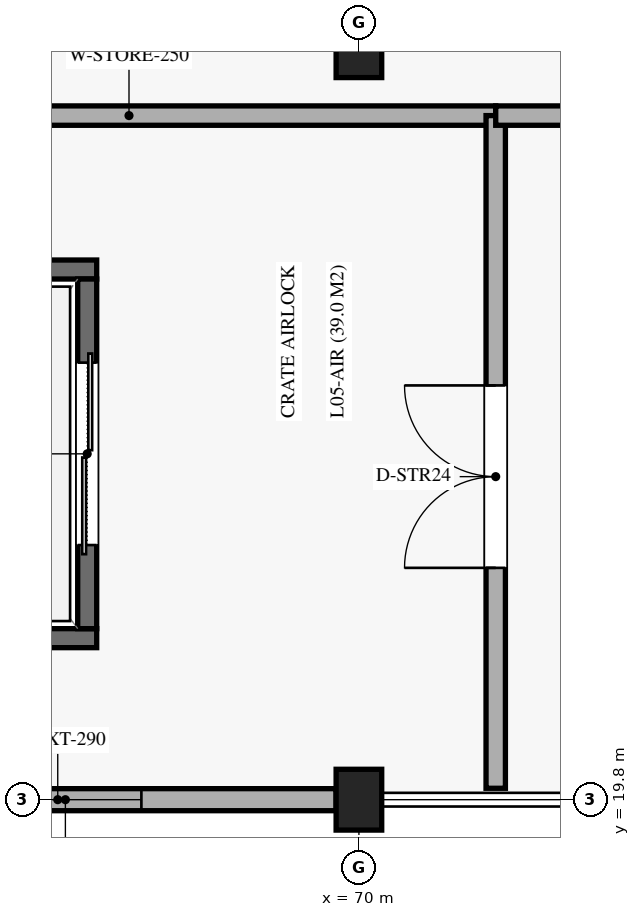
"""IFC4 building model, lengths in metres.
Left out: names, types, materials, properties, quantities, classifications, styles, units other than length and angle.
Written with IfcOpenShell. Run it as: python <this file> out.ifc"""

import sys

from ifc_helpers import new_model, si_unit, direction, frame, frame_2d, origin, origin_2d, place, context, subcontext, project, spatial, rectangle, extrude, element, fill, save


model = new_model("IFC4")
c1 = context("Model", 3, precision=1e-05, world=origin(), true_north=direction((0.0, 1.0)))
c2 = subcontext(c1, "Body", "Model", "MODEL_VIEW")
j1 = project(units=[si_unit("LENGTHUNIT", "METRE"), si_unit("PLANEANGLEUNIT", "RADIAN")], contexts=[c1])
p1 = place(None, origin())
s1 = spatial("IfcSite", under=j1, at=p1, CompositionType="ELEMENT")
p2 = place(p1, origin())
s2 = spatial("IfcBuilding", under=s1, at=p2, CompositionType="ELEMENT")
p3 = place(p2, frame((0.0, 0.0, 28.56)))
s3 = spatial("IfcBuildingStorey", under=s2, at=p3, CompositionType="ELEMENT", Elevation=28.56)
for number, where, z_axis, x_axis in (
    (1, (70.0, 19.8, 0.0), (0.0, 0.0, 1.0), (1.0, 0.0, 0.0)),
    (2, (70.0, 29.7, 0.0), (0.0, 0.0, 1.0), (1.0, 0.0, 0.0)),
):
    element("IfcColumn", number, at=place(p3, frame(where, z_axis=z_axis, x_axis=x_axis)), inside=s3, PredefinedType="COLUMN", context=c2, shape_type="SweptSolid", body=[
        extrude(rectangle(XDim=0.6, YDim=0.8, at=origin_2d()), origin(), (0.0, 0.0, 1.0), 4.59),
    ])
p4 = place(p3, frame((62.375, 19.8, 0.0), z_axis=(0.0, 0.0, 1.0), x_axis=(1.0, 0.0, 0.0)))
e3 = element("IfcWall", 3, at=p4, inside=s3, PredefinedType="SOLIDWALL", context=c2, shape_type="SweptSolid", body=[
    extrude(rectangle(XDim=7.325, YDim=0.29, at=frame_2d((3.663, 0.0))), origin(), (0.0, 0.0, 1.0), 3.57),
])
p5 = place(p4, frame((2.763, 0.0, 1.05)))
e4 = element("IfcOpeningElement", 4, at=p5, cuts=e3, PredefinedType="OPENING", context=c2, shape_type="SweptSolid", body=[
    extrude(rectangle(XDim=2.0, YDim=1.75, at=frame_2d((1.0, 0.875))), frame((0.0, 0.155, 0.0), z_axis=(0.0, -1.0, 0.0), x_axis=(1.0, 0.0, 0.0)), (0.0, 0.0, 1.0), 0.31),
])
for number, where, z_axis, x_axis in (
    (5, (62.65, 21.925, 0.0), (0.0, 0.0, 1.0), (1.0, 0.0, 0.0)),
    (6, (62.65, 26.775, 0.0), (0.0, 0.0, 1.0), (1.0, 0.0, 0.0)),
):
    element("IfcWall", number, at=place(p3, frame(where, z_axis=z_axis, x_axis=x_axis)), inside=s3, PredefinedType="SOLIDWALL", context=c2, shape_type="SweptSolid", body=[
        extrude(rectangle(XDim=3.9, YDim=0.25, at=frame_2d((1.95, 0.0))), origin(), (0.0, 0.0, 1.0), 4.33),
    ])
p6 = place(p3, frame((66.425, 22.05, 0.0), z_axis=(0.0, 0.0, 1.0), x_axis=(0.0, 1.0, 0.0)))
e7 = element("IfcWall", 7, at=p6, inside=s3, PredefinedType="SOLIDWALL", context=c2, shape_type="SweptSolid", body=[
    extrude(rectangle(XDim=4.6, YDim=0.25, at=frame_2d((2.3, 0.0))), origin(), (0.0, 0.0, 1.0), 4.33),
])
p7 = place(p6, frame((1.1, 0.0, 0.0)))
e8 = element("IfcOpeningElement", 8, at=p7, cuts=e7, PredefinedType="OPENING", context=c2, shape_type="SweptSolid", body=[
    extrude(rectangle(XDim=2.4, YDim=2.65, at=frame_2d((1.2, 1.325))), frame((0.0, 0.135, 0.0), z_axis=(0.0, -1.0, 0.0), x_axis=(1.0, 0.0, 0.0)), (0.0, 0.0, 1.0), 0.27),
])
p8 = place(p3, frame((62.15, 28.8, 0.0), z_axis=(0.0, 0.0, 1.0), x_axis=(1.0, 0.0, 0.0)))
e9 = element("IfcWall", 9, at=p8, inside=s3, PredefinedType="SOLIDWALL", context=c2, shape_type="SweptSolid", body=[
    extrude(rectangle(XDim=9.65, YDim=0.255, at=frame_2d((4.825, 0.0))), origin(), (0.0, 0.0, 1.0), 3.47),
])
p9 = place(p3, frame((71.8, 19.95, 0.0), z_axis=(0.0, 0.0, 1.0), x_axis=(0.0, 1.0, 0.0)))
e10 = element("IfcWall", 10, at=p9, inside=s3, PredefinedType="SOLIDWALL", context=c2, shape_type="SweptSolid", body=[
    extrude(rectangle(XDim=8.85, YDim=0.255, at=frame_2d((4.425, 0.0))), origin(), (0.0, 0.0, 1.0), 3.47),
])
p10 = place(p9, frame((2.9, 0.0, 0.0)))
e11 = element("IfcOpeningElement", 11, at=p10, cuts=e10, PredefinedType="OPENING", context=c2, shape_type="SweptSolid", body=[
    extrude(rectangle(XDim=2.4, YDim=2.5, at=frame_2d((1.2, 1.25))), frame((0.0, 0.137, 0.0), z_axis=(0.0, -1.0, 0.0), x_axis=(1.0, 0.0, 0.0)), (0.0, 0.0, 1.0), 0.275),
])
p11 = place(p3, frame((71.8, 28.8, 0.0), z_axis=(0.0, 0.0, 1.0), x_axis=(1.0, 0.0, 0.0)))
e12 = element("IfcWall", 12, at=p11, inside=s3, PredefinedType="SOLIDWALL", context=c2, shape_type="SweptSolid", body=[
    extrude(rectangle(XDim=2.2, YDim=0.255, at=frame_2d((1.1, 0.0))), origin(), (0.0, 0.0, 1.0), 3.47),
])
p12 = place(p5, origin())
e13 = element("IfcWindow", 13, at=p12, inside=s3, PartitioningType="SINGLE_PANEL", PredefinedType="WINDOW", context=c2, shape_type="SweptSolid", body=[
    extrude(rectangle(XDim=2.0, YDim=1.75, at=frame_2d((1.0, 0.875))), frame((0.0, 0.03, 0.0), z_axis=(0.0, -1.0, 0.0), x_axis=(1.0, 0.0, 0.0)), (0.0, 0.0, 1.0), 0.06),
])
fill(e4, e13)
p13 = place(p7, origin())
e14 = element("IfcDoor", 14, at=p13, inside=s3, OperationType="DOUBLE_DOOR_SLIDING", PredefinedType="DOOR", context=c2, shape_type="SweptSolid", body=[
    extrude(rectangle(XDim=2.4, YDim=2.65, at=frame_2d((1.2, 1.325))), frame((0.0, 0.025, 0.0), z_axis=(0.0, -1.0, 0.0), x_axis=(1.0, 0.0, 0.0)), (0.0, 0.0, 1.0), 0.05),
])
fill(e8, e14)
p14 = place(p10, origin())
e15 = element("IfcDoor", 15, at=p14, inside=s3, OperationType="DOUBLE_DOOR_SINGLE_SWING", PredefinedType="DOOR", context=c2, shape_type="SweptSolid", body=[
    extrude(rectangle(XDim=2.4, YDim=2.5, at=frame_2d((1.2, 1.25))), frame((0.0, 0.025, 0.0), z_axis=(0.0, -1.0, 0.0), x_axis=(1.0, 0.0, 0.0)), (0.0, 0.0, 1.0), 0.05),
])
fill(e11, e15)
save(model, sys.argv[1])
